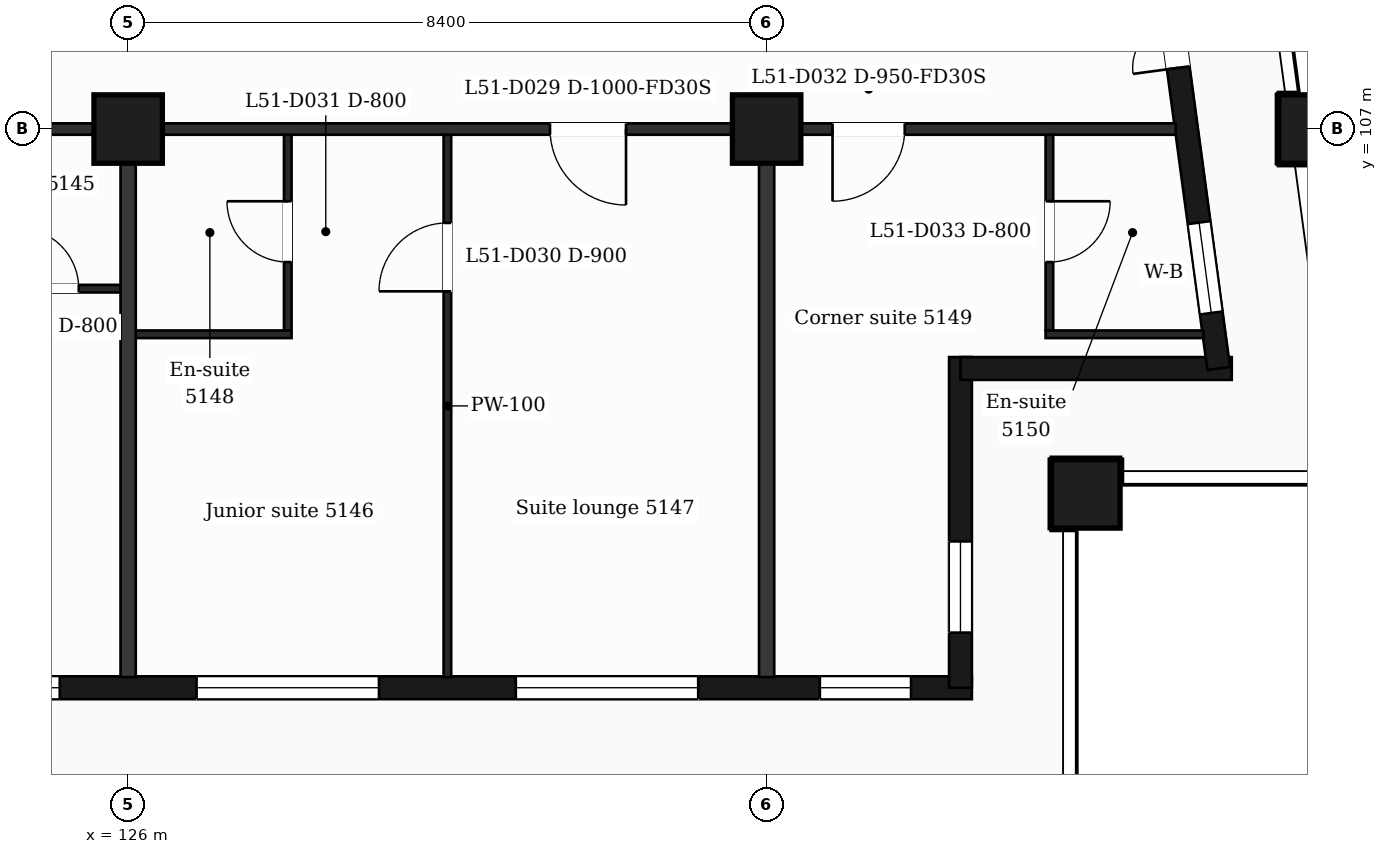
"""IFC4 building model, lengths in metres.
Left out: names, types, materials, properties, quantities, classifications, styles, units other than length and angle.
Written with IfcOpenShell. Run it as: python <this file> out.ifc"""

import sys

from ifc_helpers import new_model, si_unit, direction, frame, frame_2d, origin, origin_2d, place, context, subcontext, project, spatial, rectangle, extrude, element, fill, save


model = new_model("IFC4")
c1 = context("Model", 3, precision=1e-05, world=origin(), true_north=direction((0.0, 1.0)))
c2 = subcontext(c1, "Body", "Model", "MODEL_VIEW")
j1 = project(units=[si_unit("LENGTHUNIT", "METRE"), si_unit("PLANEANGLEUNIT", "RADIAN")], contexts=[c1])
p1 = place(None, origin())
s1 = spatial("IfcSite", under=j1, at=p1, CompositionType="ELEMENT")
p2 = place(p1, origin())
s2 = spatial("IfcBuilding", under=s1, at=p2, CompositionType="ELEMENT")
p3 = place(p2, frame((0.0, 0.0, 213.3)))
s3 = spatial("IfcBuildingStorey", under=s2, at=p3, CompositionType="ELEMENT", Elevation=213.3)
for number, where, z_axis, x_axis in (
    (1, (138.6, 102.2, 0.0), (0.0, 0.0, 1.0), (1.0, 0.0, 0.0)),
    (2, (126.0, 107.0, 0.0), (0.0, 0.0, 1.0), (1.0, 0.0, 0.0)),
    (3, (134.4, 107.0, 0.0), (0.0, 0.0, 1.0), (1.0, 0.0, 0.0)),
    (4, (141.588, 107.0, 0.0), (0.0, 0.0, 1.0), (1.0, 0.0, 0.0)),
):
    element("IfcColumn", number, at=place(p3, frame(where, z_axis=z_axis, x_axis=x_axis)), inside=s3, PredefinedType="COLUMN", context=c2, shape_type="SweptSolid", body=[
        extrude(rectangle(XDim=0.9, YDim=0.9, at=origin_2d()), origin(), (0.0, 0.0, 1.0), 3.7),
    ])
p4 = place(p3, frame((89.85, 99.65, 0.0), z_axis=(0.0, 0.0, 1.0), x_axis=(1.0, 0.0, 0.0)))
e5 = element("IfcWall", 5, at=p4, inside=s3, PredefinedType="SOLIDWALL", context=c2, shape_type="SweptSolid", body=[
    extrude(rectangle(XDim=47.25, YDim=0.3, at=frame_2d((23.625, 0.0))), origin(), (0.0, 0.0, 1.0), 3.38),
])
p5 = place(p4, frame((0.725, 0.0, 0.9)))
e6 = element("IfcOpeningElement", 6, at=p5, cuts=e5, PredefinedType="OPENING", context=c2, shape_type="SweptSolid", body=[
    extrude(rectangle(XDim=1.2, YDim=2.1, at=frame_2d((0.6, 1.05))), frame((0.0, 0.16, 0.0), z_axis=(0.0, -1.0, 0.0), x_axis=(1.0, 0.0, 0.0)), (0.0, 0.0, 1.0), 0.32),
])
p6 = place(p4, frame((3.45, 0.0, 0.9)))
e7 = element("IfcOpeningElement", 7, at=p6, cuts=e5, PredefinedType="OPENING", context=c2, shape_type="SweptSolid", body=[
    extrude(rectangle(XDim=2.4, YDim=2.1, at=frame_2d((1.2, 1.05))), frame((0.0, 0.16, 0.0), z_axis=(0.0, -1.0, 0.0), x_axis=(1.0, 0.0, 0.0)), (0.0, 0.0, 1.0), 0.32),
])
p7 = place(p4, frame((7.35, 0.0, 0.0)))
e8 = element("IfcOpeningElement", 8, at=p7, cuts=e5, PredefinedType="OPENING", context=c2, shape_type="SweptSolid", body=[
    extrude(rectangle(XDim=1.2, YDim=2.4, at=frame_2d((0.6, 1.2))), frame((0.0, 0.16, 0.0), z_axis=(0.0, -1.0, 0.0), x_axis=(1.0, 0.0, 0.0)), (0.0, 0.0, 1.0), 0.32),
])
p8 = place(p4, frame((9.15, 0.0, 0.9)))
e9 = element("IfcOpeningElement", 9, at=p8, cuts=e5, PredefinedType="OPENING", context=c2, shape_type="SweptSolid", body=[
    extrude(rectangle(XDim=1.2, YDim=2.1, at=frame_2d((0.6, 1.05))), frame((0.0, 0.16, 0.0), z_axis=(0.0, -1.0, 0.0), x_axis=(1.0, 0.0, 0.0)), (0.0, 0.0, 1.0), 0.32),
])
p9 = place(p4, frame((11.85, 0.0, 0.9)))
e10 = element("IfcOpeningElement", 10, at=p9, cuts=e5, PredefinedType="OPENING", context=c2, shape_type="SweptSolid", body=[
    extrude(rectangle(XDim=2.4, YDim=2.1, at=frame_2d((1.2, 1.05))), frame((0.0, 0.16, 0.0), z_axis=(0.0, -1.0, 0.0), x_axis=(1.0, 0.0, 0.0)), (0.0, 0.0, 1.0), 0.32),
])
p10 = place(p4, frame((16.05, 0.0, 0.9)))
e11 = element("IfcOpeningElement", 11, at=p10, cuts=e5, PredefinedType="OPENING", context=c2, shape_type="SweptSolid", body=[
    extrude(rectangle(XDim=2.4, YDim=2.1, at=frame_2d((1.2, 1.05))), frame((0.0, 0.16, 0.0), z_axis=(0.0, -1.0, 0.0), x_axis=(1.0, 0.0, 0.0)), (0.0, 0.0, 1.0), 0.32),
])
p11 = place(p4, frame((20.85, 0.0, 0.9)))
e12 = element("IfcOpeningElement", 12, at=p11, cuts=e5, PredefinedType="OPENING", context=c2, shape_type="SweptSolid", body=[
    extrude(rectangle(XDim=1.2, YDim=2.1, at=frame_2d((0.6, 1.05))), frame((0.0, 0.16, 0.0), z_axis=(0.0, -1.0, 0.0), x_axis=(1.0, 0.0, 0.0)), (0.0, 0.0, 1.0), 0.32),
])
p12 = place(p4, frame((25.05, 0.0, 0.9)))
e13 = element("IfcOpeningElement", 13, at=p12, cuts=e5, PredefinedType="OPENING", context=c2, shape_type="SweptSolid", body=[
    extrude(rectangle(XDim=1.2, YDim=2.1, at=frame_2d((0.6, 1.05))), frame((0.0, 0.16, 0.0), z_axis=(0.0, -1.0, 0.0), x_axis=(1.0, 0.0, 0.0)), (0.0, 0.0, 1.0), 0.32),
])
p13 = place(p4, frame((28.65, 0.0, 0.9)))
e14 = element("IfcOpeningElement", 14, at=p13, cuts=e5, PredefinedType="OPENING", context=c2, shape_type="SweptSolid", body=[
    extrude(rectangle(XDim=2.4, YDim=2.1, at=frame_2d((1.2, 1.05))), frame((0.0, 0.16, 0.0), z_axis=(0.0, -1.0, 0.0), x_axis=(1.0, 0.0, 0.0)), (0.0, 0.0, 1.0), 0.32),
])
p14 = place(p4, frame((32.85, 0.0, 0.9)))
e15 = element("IfcOpeningElement", 15, at=p14, cuts=e5, PredefinedType="OPENING", context=c2, shape_type="SweptSolid", body=[
    extrude(rectangle(XDim=2.4, YDim=2.1, at=frame_2d((1.2, 1.05))), frame((0.0, 0.16, 0.0), z_axis=(0.0, -1.0, 0.0), x_axis=(1.0, 0.0, 0.0)), (0.0, 0.0, 1.0), 0.32),
])
p15 = place(p4, frame((37.05, 0.0, 0.9)))
e16 = element("IfcOpeningElement", 16, at=p15, cuts=e5, PredefinedType="OPENING", context=c2, shape_type="SweptSolid", body=[
    extrude(rectangle(XDim=2.4, YDim=2.1, at=frame_2d((1.2, 1.05))), frame((0.0, 0.16, 0.0), z_axis=(0.0, -1.0, 0.0), x_axis=(1.0, 0.0, 0.0)), (0.0, 0.0, 1.0), 0.32),
])
p16 = place(p4, frame((41.25, 0.0, 0.9)))
e17 = element("IfcOpeningElement", 17, at=p16, cuts=e5, PredefinedType="OPENING", context=c2, shape_type="SweptSolid", body=[
    extrude(rectangle(XDim=2.4, YDim=2.1, at=frame_2d((1.2, 1.05))), frame((0.0, 0.16, 0.0), z_axis=(0.0, -1.0, 0.0), x_axis=(1.0, 0.0, 0.0)), (0.0, 0.0, 1.0), 0.32),
])
p17 = place(p4, frame((45.25, 0.0, 0.9)))
e18 = element("IfcOpeningElement", 18, at=p17, cuts=e5, PredefinedType="OPENING", context=c2, shape_type="SweptSolid", body=[
    extrude(rectangle(XDim=1.2, YDim=2.1, at=frame_2d((0.6, 1.05))), frame((0.0, 0.16, 0.0), z_axis=(0.0, -1.0, 0.0), x_axis=(1.0, 0.0, 0.0)), (0.0, 0.0, 1.0), 0.32),
])
p18 = place(p3, frame((136.95, 99.65, 0.0), z_axis=(0.0, 0.0, 1.0), x_axis=(0.0, 1.0, 0.0)))
e19 = element("IfcWall", 19, at=p18, inside=s3, PredefinedType="SOLIDWALL", context=c2, shape_type="SweptSolid", body=[
    extrude(rectangle(XDim=4.35, YDim=0.3, at=frame_2d((2.175, 0.0))), origin(), (0.0, 0.0, 1.0), 3.38),
])
p19 = place(p18, frame((0.725, 0.0, 0.9)))
e20 = element("IfcOpeningElement", 20, at=p19, cuts=e19, PredefinedType="OPENING", context=c2, shape_type="SweptSolid", body=[
    extrude(rectangle(XDim=1.2, YDim=2.1, at=frame_2d((0.6, 1.05))), frame((0.0, 0.16, 0.0), z_axis=(0.0, -1.0, 0.0), x_axis=(1.0, 0.0, 0.0)), (0.0, 0.0, 1.0), 0.32),
])
p20 = place(p3, frame((136.95, 103.85, 0.0), z_axis=(0.0, 0.0, 1.0), x_axis=(1.0, 0.0, 0.0)))
e21 = element("IfcWall", 21, at=p20, inside=s3, PredefinedType="SOLIDWALL", context=c2, shape_type="SweptSolid", body=[
    extrude(rectangle(XDim=3.569, YDim=0.3, at=frame_2d((1.785, 0.0))), origin(), (0.0, 0.0, 1.0), 3.38),
])
p21 = place(p3, frame((140.348, 103.85, 0.0), z_axis=(0.0, 0.0, 1.0), x_axis=(-0.133431549479, 0.991058031401, 0.0)))
e22 = element("IfcWall", 22, at=p21, inside=s3, PredefinedType="SOLIDWALL", context=c2, shape_type="SweptSolid", body=[
    extrude(rectangle(XDim=6.609, YDim=0.3, at=frame_2d((3.304, 0.0))), origin(), (0.0, 0.0, 1.0), 3.38),
])
p22 = place(p21, frame((0.737, 0.0, 0.9)))
e23 = element("IfcOpeningElement", 23, at=p22, cuts=e22, PredefinedType="OPENING", context=c2, shape_type="SweptSolid", body=[
    extrude(rectangle(XDim=1.2, YDim=2.1, at=frame_2d((0.6, 1.05))), frame((0.0, 0.16, 0.0), z_axis=(0.0, -1.0, 0.0), x_axis=(1.0, 0.0, 0.0)), (0.0, 0.0, 1.0), 0.32),
])
p23 = place(p21, frame((3.991, 0.0, 0.0)))
e24 = element("IfcOpeningElement", 24, at=p23, cuts=e22, PredefinedType="OPENING", context=c2, shape_type="SweptSolid", body=[
    extrude(rectangle(XDim=1.2, YDim=2.4, at=frame_2d((0.6, 1.2))), frame((0.0, 0.16, 0.0), z_axis=(0.0, -1.0, 0.0), x_axis=(1.0, 0.0, 0.0)), (0.0, 0.0, 1.0), 0.32),
])
p24 = place(p3, frame((126.0, 104.3, 0.0), z_axis=(0.0, 0.0, 1.0), x_axis=(1.0, 0.0, 0.0)))
e25 = element("IfcWall", 25, at=p24, inside=s3, PredefinedType="PARTITIONING", context=c2, shape_type="SweptSolid", body=[
    extrude(rectangle(XDim=2.15, YDim=0.1, at=frame_2d((1.075, 0.0))), origin(), (0.0, 0.0, 1.0), 3.38),
])
p25 = place(p3, frame((138.07, 104.3, 0.0), z_axis=(0.0, 0.0, 1.0), x_axis=(1.0, 0.0, 0.0)))
e26 = element("IfcWall", 26, at=p25, inside=s3, PredefinedType="PARTITIONING", context=c2, shape_type="SweptSolid", body=[
    extrude(rectangle(XDim=2.076, YDim=0.1, at=frame_2d((1.038, 0.0))), origin(), (0.0, 0.0, 1.0), 3.38),
])
p26 = place(p3, frame((123.25, 104.9, 0.0), z_axis=(0.0, 0.0, 1.0), x_axis=(1.0, 0.0, 0.0)))
e27 = element("IfcWall", 27, at=p26, inside=s3, PredefinedType="PARTITIONING", context=c2, shape_type="SweptSolid", body=[
    extrude(rectangle(XDim=2.75, YDim=0.1, at=frame_2d((1.375, 0.0))), origin(), (0.0, 0.0, 1.0), 3.38),
])
p27 = place(p26, frame((1.3, 0.0, 0.0)))
e28 = element("IfcOpeningElement", 28, at=p27, cuts=e27, PredefinedType="OPENING", context=c2, shape_type="SweptSolid", body=[
    extrude(rectangle(XDim=0.8, YDim=2.1, at=frame_2d((0.4, 1.05))), frame((0.0, 0.06, 0.0), z_axis=(0.0, -1.0, 0.0), x_axis=(1.0, 0.0, 0.0)), (0.0, 0.0, 1.0), 0.12),
])
p28 = place(p3, frame((87.018, 107.0, 0.0), z_axis=(0.0, 0.0, 1.0), x_axis=(1.0, 0.0, 0.0)))
e29 = element("IfcWall", 29, at=p28, inside=s3, PredefinedType="PARTITIONING", context=c2, shape_type="SweptSolid", body=[
    extrude(rectangle(XDim=52.765, YDim=0.15, at=frame_2d((26.382, 0.0))), origin(), (0.0, 0.0, 1.0), 3.38),
])
p29 = place(p28, frame((1.276, 0.0, 0.0)))
e30 = element("IfcOpeningElement", 30, at=p29, cuts=e29, PredefinedType="OPENING", context=c2, shape_type="SweptSolid", body=[
    extrude(rectangle(XDim=0.95, YDim=2.1, at=frame_2d((0.475, 1.05))), frame((0.0, 0.085, 0.0), z_axis=(0.0, -1.0, 0.0), x_axis=(1.0, 0.0, 0.0)), (0.0, 0.0, 1.0), 0.17),
])
p30 = place(p28, frame((6.034, 0.0, 0.0)))
e31 = element("IfcOpeningElement", 31, at=p30, cuts=e29, PredefinedType="OPENING", context=c2, shape_type="SweptSolid", body=[
    extrude(rectangle(XDim=0.95, YDim=2.1, at=frame_2d((0.475, 1.05))), frame((0.0, 0.085, 0.0), z_axis=(0.0, -1.0, 0.0), x_axis=(1.0, 0.0, 0.0)), (0.0, 0.0, 1.0), 0.17),
])
p31 = place(p28, frame((15.445, 0.0, 0.0)))
e32 = element("IfcOpeningElement", 32, at=p31, cuts=e29, PredefinedType="OPENING", context=c2, shape_type="SweptSolid", body=[
    extrude(rectangle(XDim=0.95, YDim=2.1, at=frame_2d((0.475, 1.05))), frame((0.0, 0.085, 0.0), z_axis=(0.0, -1.0, 0.0), x_axis=(1.0, 0.0, 0.0)), (0.0, 0.0, 1.0), 0.17),
])
p32 = place(p28, frame((18.369, 0.0, 0.0)))
e33 = element("IfcOpeningElement", 33, at=p32, cuts=e29, PredefinedType="OPENING", context=c2, shape_type="SweptSolid", body=[
    extrude(rectangle(XDim=0.95, YDim=2.1, at=frame_2d((0.475, 1.05))), frame((0.0, 0.085, 0.0), z_axis=(0.0, -1.0, 0.0), x_axis=(1.0, 0.0, 0.0)), (0.0, 0.0, 1.0), 0.17),
])
p33 = place(p28, frame((24.519, 0.0, 0.0)))
e34 = element("IfcOpeningElement", 34, at=p33, cuts=e29, PredefinedType="OPENING", context=c2, shape_type="SweptSolid", body=[
    extrude(rectangle(XDim=0.95, YDim=2.1, at=frame_2d((0.475, 1.05))), frame((0.0, 0.085, 0.0), z_axis=(0.0, -1.0, 0.0), x_axis=(1.0, 0.0, 0.0)), (0.0, 0.0, 1.0), 0.17),
])
p34 = place(p28, frame((26.632, 0.0, 0.0)))
e35 = element("IfcOpeningElement", 35, at=p34, cuts=e29, PredefinedType="OPENING", context=c2, shape_type="SweptSolid", body=[
    extrude(rectangle(XDim=1.0, YDim=2.1, at=frame_2d((0.5, 1.05))), frame((0.0, 0.085, 0.0), z_axis=(0.0, -1.0, 0.0), x_axis=(1.0, 0.0, 0.0)), (0.0, 0.0, 1.0), 0.17),
])
p35 = place(p28, frame((33.422, 0.0, 0.0)))
e36 = element("IfcOpeningElement", 36, at=p35, cuts=e29, PredefinedType="OPENING", context=c2, shape_type="SweptSolid", body=[
    extrude(rectangle(XDim=0.95, YDim=2.1, at=frame_2d((0.475, 1.05))), frame((0.0, 0.085, 0.0), z_axis=(0.0, -1.0, 0.0), x_axis=(1.0, 0.0, 0.0)), (0.0, 0.0, 1.0), 0.17),
])
p36 = place(p28, frame((35.057, 0.0, 0.0)))
e37 = element("IfcOpeningElement", 37, at=p36, cuts=e29, PredefinedType="OPENING", context=c2, shape_type="SweptSolid", body=[
    extrude(rectangle(XDim=0.95, YDim=2.1, at=frame_2d((0.475, 1.05))), frame((0.0, 0.085, 0.0), z_axis=(0.0, -1.0, 0.0), x_axis=(1.0, 0.0, 0.0)), (0.0, 0.0, 1.0), 0.17),
])
p37 = place(p28, frame((44.532, 0.0, 0.0)))
e38 = element("IfcOpeningElement", 38, at=p37, cuts=e29, PredefinedType="OPENING", context=c2, shape_type="SweptSolid", body=[
    extrude(rectangle(XDim=1.0, YDim=2.1, at=frame_2d((0.5, 1.05))), frame((0.0, 0.085, 0.0), z_axis=(0.0, -1.0, 0.0), x_axis=(1.0, 0.0, 0.0)), (0.0, 0.0, 1.0), 0.17),
])
p38 = place(p28, frame((48.249, 0.0, 0.0)))
e39 = element("IfcOpeningElement", 39, at=p38, cuts=e29, PredefinedType="OPENING", context=c2, shape_type="SweptSolid", body=[
    extrude(rectangle(XDim=0.95, YDim=2.1, at=frame_2d((0.475, 1.05))), frame((0.0, 0.085, 0.0), z_axis=(0.0, -1.0, 0.0), x_axis=(1.0, 0.0, 0.0)), (0.0, 0.0, 1.0), 0.17),
])
p39 = place(p3, frame((126.0, 99.79, 0.0), z_axis=(0.0, 0.0, 1.0), x_axis=(0.0, 1.0, 0.0)))
e40 = element("IfcWall", 40, at=p39, inside=s3, PredefinedType="PARTITIONING", context=c2, shape_type="SweptSolid", body=[
    extrude(rectangle(XDim=7.135, YDim=0.2, at=frame_2d((3.567, 0.0))), origin(), (0.0, 0.0, 1.0), 3.38),
])
p40 = place(p3, frame((128.1, 104.35, 0.0), z_axis=(0.0, 0.0, 1.0), x_axis=(0.0, 1.0, 0.0)))
e41 = element("IfcWall", 41, at=p40, inside=s3, PredefinedType="PARTITIONING", context=c2, shape_type="SweptSolid", body=[
    extrude(rectangle(XDim=2.575, YDim=0.1, at=frame_2d((1.288, 0.0))), origin(), (0.0, 0.0, 1.0), 3.38),
])
p41 = place(p40, frame((0.9, 0.0, 0.0)))
e42 = element("IfcOpeningElement", 42, at=p41, cuts=e41, PredefinedType="OPENING", context=c2, shape_type="SweptSolid", body=[
    extrude(rectangle(XDim=0.8, YDim=2.1, at=frame_2d((0.4, 1.05))), frame((0.0, 0.06, 0.0), z_axis=(0.0, -1.0, 0.0), x_axis=(1.0, 0.0, 0.0)), (0.0, 0.0, 1.0), 0.12),
])
p42 = place(p3, frame((130.2, 99.79, 0.0), z_axis=(0.0, 0.0, 1.0), x_axis=(0.0, 1.0, 0.0)))
e43 = element("IfcWall", 43, at=p42, inside=s3, PredefinedType="PARTITIONING", context=c2, shape_type="SweptSolid", body=[
    extrude(rectangle(XDim=7.135, YDim=0.1, at=frame_2d((3.567, 0.0))), origin(), (0.0, 0.0, 1.0), 3.38),
])
p43 = place(p42, frame((5.075, 0.0, 0.0)))
e44 = element("IfcOpeningElement", 44, at=p43, cuts=e43, PredefinedType="OPENING", context=c2, shape_type="SweptSolid", body=[
    extrude(rectangle(XDim=0.9, YDim=2.1, at=frame_2d((0.45, 1.05))), frame((0.0, 0.06, 0.0), z_axis=(0.0, -1.0, 0.0), x_axis=(1.0, 0.0, 0.0)), (0.0, 0.0, 1.0), 0.12),
])
p44 = place(p3, frame((134.4, 99.79, 0.0), z_axis=(0.0, 0.0, 1.0), x_axis=(0.0, 1.0, 0.0)))
e45 = element("IfcWall", 45, at=p44, inside=s3, PredefinedType="PARTITIONING", context=c2, shape_type="SweptSolid", body=[
    extrude(rectangle(XDim=7.135, YDim=0.2, at=frame_2d((3.567, 0.0))), origin(), (0.0, 0.0, 1.0), 3.38),
])
p45 = place(p3, frame((138.12, 104.35, 0.0), z_axis=(0.0, 0.0, 1.0), x_axis=(0.0, 1.0, 0.0)))
e46 = element("IfcWall", 46, at=p45, inside=s3, PredefinedType="PARTITIONING", context=c2, shape_type="SweptSolid", body=[
    extrude(rectangle(XDim=2.575, YDim=0.1, at=frame_2d((1.288, 0.0))), origin(), (0.0, 0.0, 1.0), 3.38),
])
p46 = place(p45, frame((0.9, 0.0, 0.0)))
e47 = element("IfcOpeningElement", 47, at=p46, cuts=e46, PredefinedType="OPENING", context=c2, shape_type="SweptSolid", body=[
    extrude(rectangle(XDim=0.8, YDim=2.1, at=frame_2d((0.4, 1.05))), frame((0.0, 0.06, 0.0), z_axis=(0.0, -1.0, 0.0), x_axis=(1.0, 0.0, 0.0)), (0.0, 0.0, 1.0), 0.12),
])
p47 = place(p14, origin())
e48 = element("IfcWindow", 48, at=p47, inside=s3, PartitioningType="SINGLE_PANEL", PredefinedType="WINDOW", context=c2, shape_type="SweptSolid", body=[
    extrude(rectangle(XDim=2.4, YDim=2.1, at=frame_2d((1.2, 1.05))), frame((0.0, 0.03, 0.0), z_axis=(0.0, -1.0, 0.0), x_axis=(1.0, 0.0, 0.0)), (0.0, 0.0, 1.0), 0.06),
])
fill(e15, e48)
p48 = place(p15, origin())
e49 = element("IfcWindow", 49, at=p48, inside=s3, PartitioningType="SINGLE_PANEL", PredefinedType="WINDOW", context=c2, shape_type="SweptSolid", body=[
    extrude(rectangle(XDim=2.4, YDim=2.1, at=frame_2d((1.2, 1.05))), frame((0.0, 0.03, 0.0), z_axis=(0.0, -1.0, 0.0), x_axis=(1.0, 0.0, 0.0)), (0.0, 0.0, 1.0), 0.06),
])
fill(e16, e49)
p49 = place(p16, origin())
e50 = element("IfcWindow", 50, at=p49, inside=s3, PartitioningType="SINGLE_PANEL", PredefinedType="WINDOW", context=c2, shape_type="SweptSolid", body=[
    extrude(rectangle(XDim=2.4, YDim=2.1, at=frame_2d((1.2, 1.05))), frame((0.0, 0.03, 0.0), z_axis=(0.0, -1.0, 0.0), x_axis=(1.0, 0.0, 0.0)), (0.0, 0.0, 1.0), 0.06),
])
fill(e17, e50)
p50 = place(p17, origin())
e51 = element("IfcWindow", 51, at=p50, inside=s3, PartitioningType="SINGLE_PANEL", PredefinedType="WINDOW", context=c2, shape_type="SweptSolid", body=[
    extrude(rectangle(XDim=1.2, YDim=2.1, at=frame_2d((0.6, 1.05))), frame((0.0, 0.03, 0.0), z_axis=(0.0, -1.0, 0.0), x_axis=(1.0, 0.0, 0.0)), (0.0, 0.0, 1.0), 0.06),
])
fill(e18, e51)
p51 = place(p19, origin())
e52 = element("IfcWindow", 52, at=p51, inside=s3, PartitioningType="SINGLE_PANEL", PredefinedType="WINDOW", context=c2, shape_type="SweptSolid", body=[
    extrude(rectangle(XDim=1.2, YDim=2.1, at=frame_2d((0.6, 1.05))), frame((0.0, 0.03, 0.0), z_axis=(0.0, -1.0, 0.0), x_axis=(1.0, 0.0, 0.0)), (0.0, 0.0, 1.0), 0.06),
])
fill(e20, e52)
p52 = place(p22, origin())
e53 = element("IfcWindow", 53, at=p52, inside=s3, PartitioningType="SINGLE_PANEL", PredefinedType="WINDOW", context=c2, shape_type="SweptSolid", body=[
    extrude(rectangle(XDim=1.2, YDim=2.1, at=frame_2d((0.6, 1.05))), frame((0.0, 0.03, 0.0), z_axis=(0.0, -1.0, 0.0), x_axis=(1.0, 0.0, 0.0)), (0.0, 0.0, 1.0), 0.06),
])
fill(e23, e53)
p53 = place(p23, origin())
e54 = element("IfcDoor", 54, at=p53, inside=s3, OperationType="DOUBLE_DOOR_SINGLE_SWING", PredefinedType="DOOR", context=c2, shape_type="SweptSolid", body=[
    extrude(rectangle(XDim=1.2, YDim=2.4, at=frame_2d((0.6, 1.2))), frame((0.0, 0.025, 0.0), z_axis=(0.0, -1.0, 0.0), x_axis=(1.0, 0.0, 0.0)), (0.0, 0.0, 1.0), 0.05),
])
fill(e24, e54)
p54 = place(p27, origin())
e55 = element("IfcDoor", 55, at=p54, inside=s3, OperationType="SINGLE_SWING_LEFT", PredefinedType="DOOR", context=c2, shape_type="SweptSolid", body=[
    extrude(rectangle(XDim=0.8, YDim=2.1, at=frame_2d((0.4, 1.05))), frame((0.0, 0.025, 0.0), z_axis=(0.0, -1.0, 0.0), x_axis=(1.0, 0.0, 0.0)), (0.0, 0.0, 1.0), 0.05),
])
fill(e28, e55)
p55 = place(p37, origin())
e56 = element("IfcDoor", 56, at=p55, inside=s3, OperationType="SINGLE_SWING_RIGHT", PredefinedType="DOOR", context=c2, shape_type="SweptSolid", body=[
    extrude(rectangle(XDim=1.0, YDim=2.1, at=frame_2d((0.5, 1.05))), frame((0.0, 0.025, 0.0), z_axis=(0.0, -1.0, 0.0), x_axis=(1.0, 0.0, 0.0)), (0.0, 0.0, 1.0), 0.05),
])
fill(e38, e56)
p56 = place(p43, origin())
e57 = element("IfcDoor", 57, at=p56, inside=s3, OperationType="SINGLE_SWING_LEFT", PredefinedType="DOOR", context=c2, shape_type="SweptSolid", body=[
    extrude(rectangle(XDim=0.9, YDim=2.1, at=frame_2d((0.45, 1.05))), frame((0.0, 0.025, 0.0), z_axis=(0.0, -1.0, 0.0), x_axis=(1.0, 0.0, 0.0)), (0.0, 0.0, 1.0), 0.05),
])
fill(e44, e57)
p57 = place(p41, origin())
e58 = element("IfcDoor", 58, at=p57, inside=s3, OperationType="SINGLE_SWING_RIGHT", PredefinedType="DOOR", context=c2, shape_type="SweptSolid", body=[
    extrude(rectangle(XDim=0.8, YDim=2.1, at=frame_2d((0.4, 1.05))), frame((0.0, 0.025, 0.0), z_axis=(0.0, -1.0, 0.0), x_axis=(1.0, 0.0, 0.0)), (0.0, 0.0, 1.0), 0.05),
])
fill(e42, e58)
p58 = place(p38, origin())
e59 = element("IfcDoor", 59, at=p58, inside=s3, OperationType="SINGLE_SWING_LEFT", PredefinedType="DOOR", context=c2, shape_type="SweptSolid", body=[
    extrude(rectangle(XDim=0.95, YDim=2.1, at=frame_2d((0.475, 1.05))), frame((0.0, 0.025, 0.0), z_axis=(0.0, -1.0, 0.0), x_axis=(1.0, 0.0, 0.0)), (0.0, 0.0, 1.0), 0.05),
])
fill(e39, e59)
p59 = place(p46, origin())
e60 = element("IfcDoor", 60, at=p59, inside=s3, OperationType="SINGLE_SWING_RIGHT", PredefinedType="DOOR", context=c2, shape_type="SweptSolid", body=[
    extrude(rectangle(XDim=0.8, YDim=2.1, at=frame_2d((0.4, 1.05))), frame((0.0, 0.025, 0.0), z_axis=(0.0, -1.0, 0.0), x_axis=(1.0, 0.0, 0.0)), (0.0, 0.0, 1.0), 0.05),
])
fill(e47, e60)
save(model, sys.argv[1])
